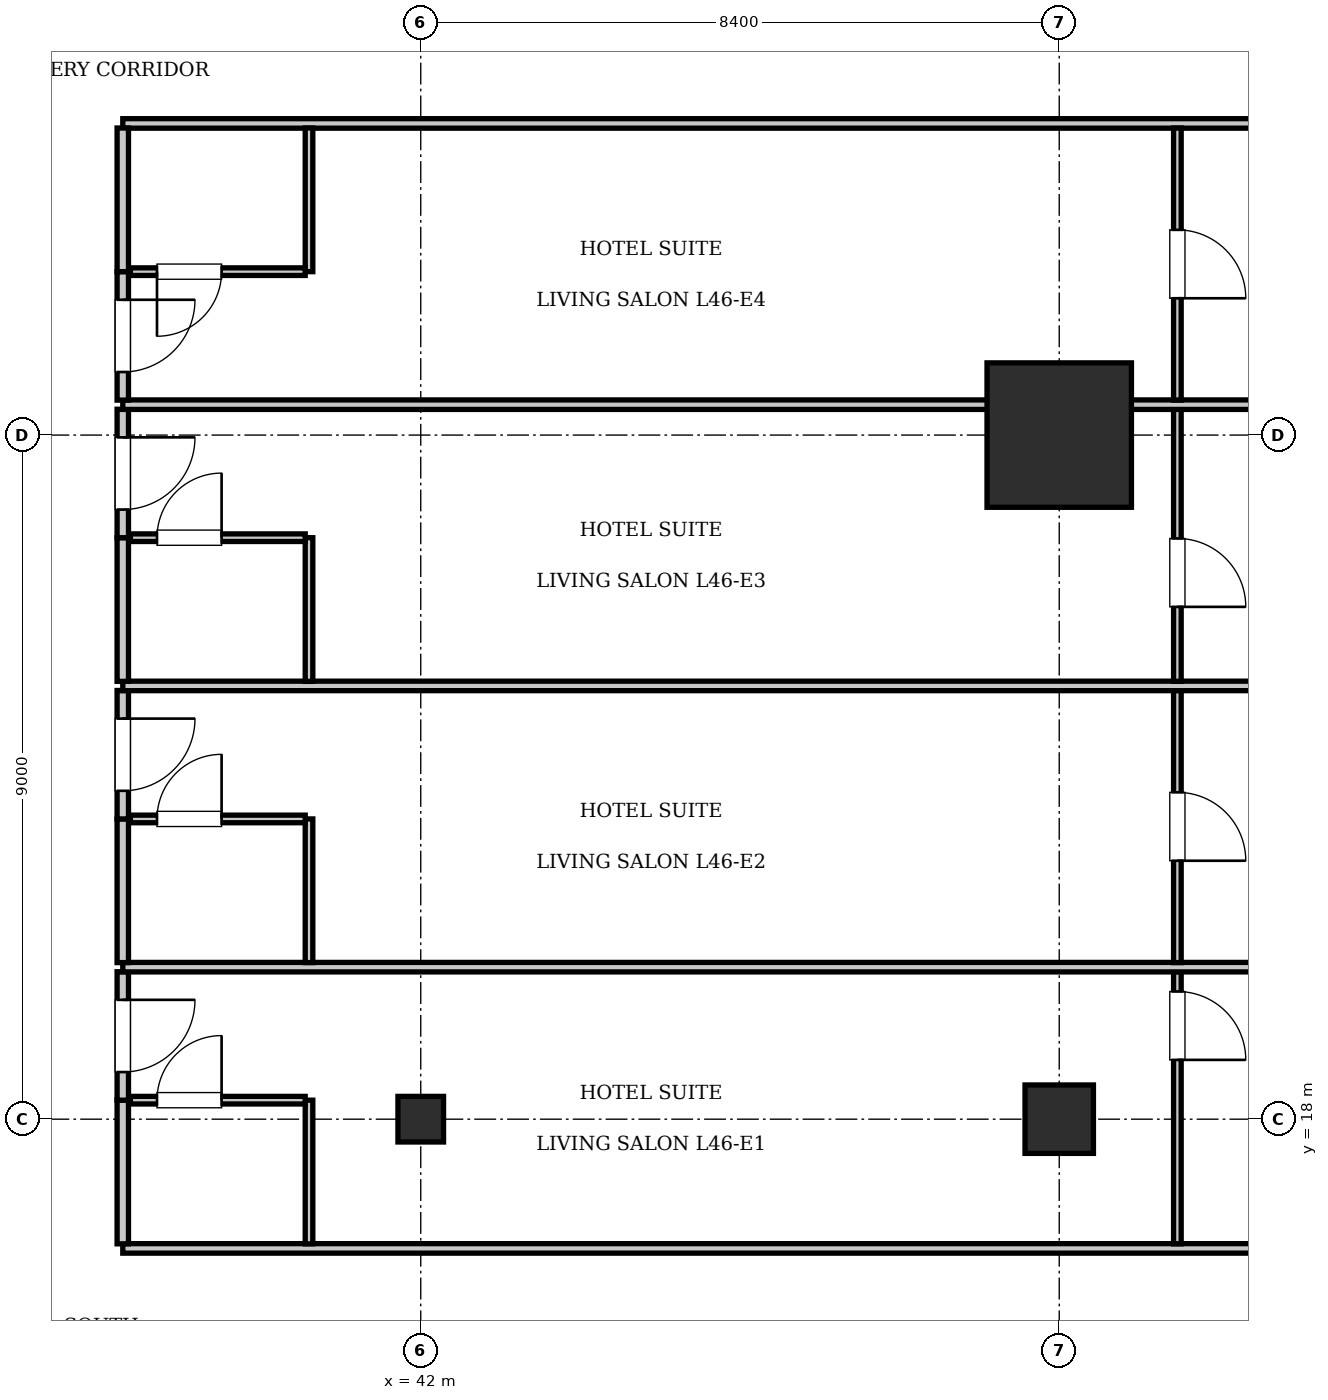
"""IFC4 building model, lengths in metres.
Left out: names, types, materials, properties, quantities, classifications, styles, units other than length and angle.
Written with IfcOpenShell. Run it as: python <this file> out.ifc"""

import sys

from ifc_helpers import new_model, si_unit, direction, frame, frame_2d, origin, origin_2d, place, context, subcontext, project, spatial, rectangle, i_section, extrude, element, fill, save


model = new_model("IFC4")
c1 = context("Model", 3, precision=1e-05, world=origin(), true_north=direction((0.0, 1.0)))
c2 = subcontext(c1, "Body", "Model", "MODEL_VIEW")
j1 = project(units=[si_unit("LENGTHUNIT", "METRE"), si_unit("PLANEANGLEUNIT", "RADIAN")], contexts=[c1])
p1 = place(None, origin())
s1 = spatial("IfcSite", under=j1, at=p1, CompositionType="ELEMENT")
p2 = place(p1, origin())
s2 = spatial("IfcBuilding", under=s1, at=p2, CompositionType="ELEMENT")
p3 = place(p2, frame((0.0, 0.0, 189.0)))
s3 = spatial("IfcBuildingStorey", under=s2, at=p3, CompositionType="ELEMENT", Elevation=189.0)
p4 = place(p3, frame((50.4, 27.0, 0.0), z_axis=(0.0, 0.0, 1.0), x_axis=(1.0, 0.0, 0.0)))
e1 = element("IfcColumn", 1, at=p4, inside=s3, PredefinedType="COLUMN", context=c2, shape_type="SweptSolid", body=[
    extrude(rectangle(XDim=1.9, YDim=1.9, at=origin_2d()), origin(), (0.0, 0.0, 1.0), 3.85),
])
p5 = place(p3, frame((50.4, 18.0, 0.0), z_axis=(0.0, 0.0, 1.0), x_axis=(1.0, 0.0, 0.0)))
e2 = element("IfcColumn", 2, at=p5, inside=s3, PredefinedType="COLUMN", context=c2, shape_type="SweptSolid", body=[
    extrude(rectangle(XDim=0.9, YDim=0.9, at=origin_2d()), origin(), (0.0, 0.0, 1.0), 3.85),
])
p6 = place(p3, frame((42.0, 18.0, 0.0), z_axis=(0.0, 0.0, 1.0), x_axis=(1.0, 0.0, 0.0)))
e3 = element("IfcColumn", 3, at=p6, inside=s3, PredefinedType="COLUMN", context=c2, shape_type="SweptSolid", body=[
    extrude(i_section(OverallWidth=0.6, OverallDepth=0.6, WebThickness=0.025, FlangeThickness=0.038, at=origin_2d()), origin(), (0.0, 0.0, 1.0), 3.85),
])
for number, where, z_axis, x_axis in (
    (4, (38.08, 16.3, 0.0), (0.0, 0.0, 1.0), (1.0, 0.0, 0.0)),
    (5, (38.08, 31.1, 0.0), (0.0, 0.0, 1.0), (1.0, 0.0, 0.0)),
):
    element("IfcWall", number, at=place(p3, frame(where, z_axis=z_axis, x_axis=x_axis)), inside=s3, PredefinedType="PARTITIONING", context=c2, shape_type="SweptSolid", body=[
        extrude(rectangle(XDim=24.32, YDim=0.125, at=frame_2d((12.16, 0.0))), origin(), (0.0, 0.0, 1.0), 3.61),
    ])
p7 = place(p3, frame((38.08, 16.36, 0.0), z_axis=(0.0, 0.0, 1.0), x_axis=(0.0, 1.0, 0.0)))
e6 = element("IfcWall", 6, at=p7, inside=s3, PredefinedType="PARTITIONING", context=c2, shape_type="SweptSolid", body=[
    extrude(rectangle(XDim=1.89, YDim=0.15, at=frame_2d((0.945, 0.0))), origin(), (0.0, 0.0, 1.0), 3.61),
])
p8 = place(p3, frame((38.08, 18.25, 0.0), z_axis=(0.0, 0.0, 1.0), x_axis=(0.0, 1.0, 0.0)))
e7 = element("IfcWall", 7, at=p8, inside=s3, PredefinedType="PARTITIONING", context=c2, shape_type="SweptSolid", body=[
    extrude(rectangle(XDim=1.69, YDim=0.15, at=frame_2d((0.845, 0.0))), origin(), (0.0, 0.0, 1.0), 3.61),
])
p9 = place(p8, frame((0.37, 0.0, 0.0)))
e8 = element("IfcOpeningElement", 8, at=p9, cuts=e7, PredefinedType="OPENING", context=c2, shape_type="SweptSolid", body=[
    extrude(rectangle(XDim=0.95, YDim=2.15, at=frame_2d((0.475, 1.075))), frame((0.0, 0.085, 0.0), z_axis=(0.0, -1.0, 0.0), x_axis=(1.0, 0.0, 0.0)), (0.0, 0.0, 1.0), 0.17),
])
p10 = place(p3, frame((40.53, 16.36, 0.0), z_axis=(0.0, 0.0, 1.0), x_axis=(0.0, 1.0, 0.0)))
e9 = element("IfcWall", 9, at=p10, inside=s3, PredefinedType="PARTITIONING", context=c2, shape_type="SweptSolid", body=[
    extrude(rectangle(XDim=1.89, YDim=0.1, at=frame_2d((0.945, 0.0))), origin(), (0.0, 0.0, 1.0), 3.61),
])
p11 = place(p3, frame((38.18, 18.25, 0.0), z_axis=(0.0, 0.0, 1.0), x_axis=(1.0, 0.0, 0.0)))
e10 = element("IfcWall", 10, at=p11, inside=s3, PredefinedType="PARTITIONING", context=c2, shape_type="SweptSolid", body=[
    extrude(rectangle(XDim=2.3, YDim=0.1, at=frame_2d((1.15, 0.0))), origin(), (0.0, 0.0, 1.0), 3.61),
])
p12 = place(p11, frame((0.35, 0.0, 0.0)))
e11 = element("IfcOpeningElement", 11, at=p12, cuts=e10, PredefinedType="OPENING", context=c2, shape_type="SweptSolid", body=[
    extrude(rectangle(XDim=0.85, YDim=2.1, at=frame_2d((0.425, 1.05))), frame((0.0, 0.06, 0.0), z_axis=(0.0, -1.0, 0.0), x_axis=(1.0, 0.0, 0.0)), (0.0, 0.0, 1.0), 0.12),
])
p13 = place(p3, frame((51.954, 16.36, 0.0), z_axis=(0.0, 0.0, 1.0), x_axis=(0.0, 1.0, 0.0)))
e12 = element("IfcWall", 12, at=p13, inside=s3, PredefinedType="PARTITIONING", context=c2, shape_type="SweptSolid", body=[
    extrude(rectangle(XDim=3.58, YDim=0.1, at=frame_2d((1.79, 0.0))), origin(), (0.0, 0.0, 1.0), 3.61),
])
p14 = place(p13, frame((2.42, 0.0, 0.0)))
e13 = element("IfcOpeningElement", 13, at=p14, cuts=e12, PredefinedType="OPENING", context=c2, shape_type="SweptSolid", body=[
    extrude(rectangle(XDim=0.9, YDim=2.1, at=frame_2d((0.45, 1.05))), frame((0.0, 0.06, 0.0), z_axis=(0.0, -1.0, 0.0), x_axis=(1.0, 0.0, 0.0)), (0.0, 0.0, 1.0), 0.12),
])
p15 = place(p3, frame((38.08, 20.0, 0.0), z_axis=(0.0, 0.0, 1.0), x_axis=(1.0, 0.0, 0.0)))
e14 = element("IfcWall", 14, at=p15, inside=s3, PredefinedType="PARTITIONING", context=c2, shape_type="SweptSolid", body=[
    extrude(rectangle(XDim=24.32, YDim=0.125, at=frame_2d((12.16, 0.0))), origin(), (0.0, 0.0, 1.0), 3.61),
])
p16 = place(p3, frame((38.08, 20.06, 0.0), z_axis=(0.0, 0.0, 1.0), x_axis=(0.0, 1.0, 0.0)))
e15 = element("IfcWall", 15, at=p16, inside=s3, PredefinedType="PARTITIONING", context=c2, shape_type="SweptSolid", body=[
    extrude(rectangle(XDim=1.89, YDim=0.15, at=frame_2d((0.945, 0.0))), origin(), (0.0, 0.0, 1.0), 3.61),
])
p17 = place(p3, frame((38.08, 21.95, 0.0), z_axis=(0.0, 0.0, 1.0), x_axis=(0.0, 1.0, 0.0)))
e16 = element("IfcWall", 16, at=p17, inside=s3, PredefinedType="PARTITIONING", context=c2, shape_type="SweptSolid", body=[
    extrude(rectangle(XDim=1.69, YDim=0.15, at=frame_2d((0.845, 0.0))), origin(), (0.0, 0.0, 1.0), 3.61),
])
p18 = place(p17, frame((0.37, 0.0, 0.0)))
e17 = element("IfcOpeningElement", 17, at=p18, cuts=e16, PredefinedType="OPENING", context=c2, shape_type="SweptSolid", body=[
    extrude(rectangle(XDim=0.95, YDim=2.15, at=frame_2d((0.475, 1.075))), frame((0.0, 0.085, 0.0), z_axis=(0.0, -1.0, 0.0), x_axis=(1.0, 0.0, 0.0)), (0.0, 0.0, 1.0), 0.17),
])
p19 = place(p3, frame((40.53, 20.06, 0.0), z_axis=(0.0, 0.0, 1.0), x_axis=(0.0, 1.0, 0.0)))
e18 = element("IfcWall", 18, at=p19, inside=s3, PredefinedType="PARTITIONING", context=c2, shape_type="SweptSolid", body=[
    extrude(rectangle(XDim=1.89, YDim=0.1, at=frame_2d((0.945, 0.0))), origin(), (0.0, 0.0, 1.0), 3.61),
])
p20 = place(p3, frame((38.18, 21.95, 0.0), z_axis=(0.0, 0.0, 1.0), x_axis=(1.0, 0.0, 0.0)))
e19 = element("IfcWall", 19, at=p20, inside=s3, PredefinedType="PARTITIONING", context=c2, shape_type="SweptSolid", body=[
    extrude(rectangle(XDim=2.3, YDim=0.1, at=frame_2d((1.15, 0.0))), origin(), (0.0, 0.0, 1.0), 3.61),
])
p21 = place(p20, frame((0.35, 0.0, 0.0)))
e20 = element("IfcOpeningElement", 20, at=p21, cuts=e19, PredefinedType="OPENING", context=c2, shape_type="SweptSolid", body=[
    extrude(rectangle(XDim=0.85, YDim=2.1, at=frame_2d((0.425, 1.05))), frame((0.0, 0.06, 0.0), z_axis=(0.0, -1.0, 0.0), x_axis=(1.0, 0.0, 0.0)), (0.0, 0.0, 1.0), 0.12),
])
p22 = place(p3, frame((51.954, 20.06, 0.0), z_axis=(0.0, 0.0, 1.0), x_axis=(0.0, 1.0, 0.0)))
e21 = element("IfcWall", 21, at=p22, inside=s3, PredefinedType="PARTITIONING", context=c2, shape_type="SweptSolid", body=[
    extrude(rectangle(XDim=3.58, YDim=0.1, at=frame_2d((1.79, 0.0))), origin(), (0.0, 0.0, 1.0), 3.61),
])
p23 = place(p22, frame((1.34, 0.0, 0.0)))
e22 = element("IfcOpeningElement", 22, at=p23, cuts=e21, PredefinedType="OPENING", context=c2, shape_type="SweptSolid", body=[
    extrude(rectangle(XDim=0.9, YDim=2.1, at=frame_2d((0.45, 1.05))), frame((0.0, 0.06, 0.0), z_axis=(0.0, -1.0, 0.0), x_axis=(1.0, 0.0, 0.0)), (0.0, 0.0, 1.0), 0.12),
])
p24 = place(p3, frame((38.08, 23.7, 0.0), z_axis=(0.0, 0.0, 1.0), x_axis=(1.0, 0.0, 0.0)))
e23 = element("IfcWall", 23, at=p24, inside=s3, PredefinedType="PARTITIONING", context=c2, shape_type="SweptSolid", body=[
    extrude(rectangle(XDim=24.32, YDim=0.125, at=frame_2d((12.16, 0.0))), origin(), (0.0, 0.0, 1.0), 3.61),
])
p25 = place(p3, frame((38.08, 23.76, 0.0), z_axis=(0.0, 0.0, 1.0), x_axis=(0.0, 1.0, 0.0)))
e24 = element("IfcWall", 24, at=p25, inside=s3, PredefinedType="PARTITIONING", context=c2, shape_type="SweptSolid", body=[
    extrude(rectangle(XDim=1.89, YDim=0.15, at=frame_2d((0.945, 0.0))), origin(), (0.0, 0.0, 1.0), 3.61),
])
p26 = place(p3, frame((38.08, 25.65, 0.0), z_axis=(0.0, 0.0, 1.0), x_axis=(0.0, 1.0, 0.0)))
e25 = element("IfcWall", 25, at=p26, inside=s3, PredefinedType="PARTITIONING", context=c2, shape_type="SweptSolid", body=[
    extrude(rectangle(XDim=1.69, YDim=0.15, at=frame_2d((0.845, 0.0))), origin(), (0.0, 0.0, 1.0), 3.61),
])
p27 = place(p26, frame((0.37, 0.0, 0.0)))
e26 = element("IfcOpeningElement", 26, at=p27, cuts=e25, PredefinedType="OPENING", context=c2, shape_type="SweptSolid", body=[
    extrude(rectangle(XDim=0.95, YDim=2.15, at=frame_2d((0.475, 1.075))), frame((0.0, 0.085, 0.0), z_axis=(0.0, -1.0, 0.0), x_axis=(1.0, 0.0, 0.0)), (0.0, 0.0, 1.0), 0.17),
])
p28 = place(p3, frame((40.53, 23.76, 0.0), z_axis=(0.0, 0.0, 1.0), x_axis=(0.0, 1.0, 0.0)))
e27 = element("IfcWall", 27, at=p28, inside=s3, PredefinedType="PARTITIONING", context=c2, shape_type="SweptSolid", body=[
    extrude(rectangle(XDim=1.89, YDim=0.1, at=frame_2d((0.945, 0.0))), origin(), (0.0, 0.0, 1.0), 3.61),
])
p29 = place(p3, frame((38.18, 25.65, 0.0), z_axis=(0.0, 0.0, 1.0), x_axis=(1.0, 0.0, 0.0)))
e28 = element("IfcWall", 28, at=p29, inside=s3, PredefinedType="PARTITIONING", context=c2, shape_type="SweptSolid", body=[
    extrude(rectangle(XDim=2.3, YDim=0.1, at=frame_2d((1.15, 0.0))), origin(), (0.0, 0.0, 1.0), 3.61),
])
p30 = place(p29, frame((0.35, 0.0, 0.0)))
e29 = element("IfcOpeningElement", 29, at=p30, cuts=e28, PredefinedType="OPENING", context=c2, shape_type="SweptSolid", body=[
    extrude(rectangle(XDim=0.85, YDim=2.1, at=frame_2d((0.425, 1.05))), frame((0.0, 0.06, 0.0), z_axis=(0.0, -1.0, 0.0), x_axis=(1.0, 0.0, 0.0)), (0.0, 0.0, 1.0), 0.12),
])
p31 = place(p3, frame((51.954, 23.76, 0.0), z_axis=(0.0, 0.0, 1.0), x_axis=(0.0, 1.0, 0.0)))
e30 = element("IfcWall", 30, at=p31, inside=s3, PredefinedType="PARTITIONING", context=c2, shape_type="SweptSolid", body=[
    extrude(rectangle(XDim=3.58, YDim=0.1, at=frame_2d((1.79, 0.0))), origin(), (0.0, 0.0, 1.0), 3.61),
])
p32 = place(p31, frame((0.98, 0.0, 0.0)))
e31 = element("IfcOpeningElement", 31, at=p32, cuts=e30, PredefinedType="OPENING", context=c2, shape_type="SweptSolid", body=[
    extrude(rectangle(XDim=0.9, YDim=2.1, at=frame_2d((0.45, 1.05))), frame((0.0, 0.06, 0.0), z_axis=(0.0, -1.0, 0.0), x_axis=(1.0, 0.0, 0.0)), (0.0, 0.0, 1.0), 0.12),
])
p33 = place(p3, frame((38.08, 27.4, 0.0), z_axis=(0.0, 0.0, 1.0), x_axis=(1.0, 0.0, 0.0)))
e32 = element("IfcWall", 32, at=p33, inside=s3, PredefinedType="PARTITIONING", context=c2, shape_type="SweptSolid", body=[
    extrude(rectangle(XDim=24.32, YDim=0.125, at=frame_2d((12.16, 0.0))), origin(), (0.0, 0.0, 1.0), 3.61),
])
p34 = place(p3, frame((38.08, 27.46, 0.0), z_axis=(0.0, 0.0, 1.0), x_axis=(0.0, 1.0, 0.0)))
e33 = element("IfcWall", 33, at=p34, inside=s3, PredefinedType="PARTITIONING", context=c2, shape_type="SweptSolid", body=[
    extrude(rectangle(XDim=1.69, YDim=0.15, at=frame_2d((0.845, 0.0))), origin(), (0.0, 0.0, 1.0), 3.61),
])
p35 = place(p34, frame((0.37, 0.0, 0.0)))
e34 = element("IfcOpeningElement", 34, at=p35, cuts=e33, PredefinedType="OPENING", context=c2, shape_type="SweptSolid", body=[
    extrude(rectangle(XDim=0.95, YDim=2.15, at=frame_2d((0.475, 1.075))), frame((0.0, 0.085, 0.0), z_axis=(0.0, -1.0, 0.0), x_axis=(1.0, 0.0, 0.0)), (0.0, 0.0, 1.0), 0.17),
])
p36 = place(p3, frame((38.08, 29.15, 0.0), z_axis=(0.0, 0.0, 1.0), x_axis=(0.0, 1.0, 0.0)))
e35 = element("IfcWall", 35, at=p36, inside=s3, PredefinedType="PARTITIONING", context=c2, shape_type="SweptSolid", body=[
    extrude(rectangle(XDim=1.89, YDim=0.15, at=frame_2d((0.945, 0.0))), origin(), (0.0, 0.0, 1.0), 3.61),
])
p37 = place(p3, frame((40.53, 29.15, 0.0), z_axis=(0.0, 0.0, 1.0), x_axis=(0.0, 1.0, 0.0)))
e36 = element("IfcWall", 36, at=p37, inside=s3, PredefinedType="PARTITIONING", context=c2, shape_type="SweptSolid", body=[
    extrude(rectangle(XDim=1.89, YDim=0.1, at=frame_2d((0.945, 0.0))), origin(), (0.0, 0.0, 1.0), 3.61),
])
p38 = place(p3, frame((38.18, 29.15, 0.0), z_axis=(0.0, 0.0, 1.0), x_axis=(1.0, 0.0, 0.0)))
e37 = element("IfcWall", 37, at=p38, inside=s3, PredefinedType="PARTITIONING", context=c2, shape_type="SweptSolid", body=[
    extrude(rectangle(XDim=2.3, YDim=0.1, at=frame_2d((1.15, 0.0))), origin(), (0.0, 0.0, 1.0), 3.61),
])
p39 = place(p38, frame((0.35, 0.0, 0.0)))
e38 = element("IfcOpeningElement", 38, at=p39, cuts=e37, PredefinedType="OPENING", context=c2, shape_type="SweptSolid", body=[
    extrude(rectangle(XDim=0.85, YDim=2.1, at=frame_2d((0.425, 1.05))), frame((0.0, 0.06, 0.0), z_axis=(0.0, -1.0, 0.0), x_axis=(1.0, 0.0, 0.0)), (0.0, 0.0, 1.0), 0.12),
])
p40 = place(p3, frame((51.954, 27.46, 0.0), z_axis=(0.0, 0.0, 1.0), x_axis=(0.0, 1.0, 0.0)))
e39 = element("IfcWall", 39, at=p40, inside=s3, PredefinedType="PARTITIONING", context=c2, shape_type="SweptSolid", body=[
    extrude(rectangle(XDim=3.58, YDim=0.1, at=frame_2d((1.79, 0.0))), origin(), (0.0, 0.0, 1.0), 3.61),
])
p41 = place(p40, frame((1.34, 0.0, 0.0)))
e40 = element("IfcOpeningElement", 40, at=p41, cuts=e39, PredefinedType="OPENING", context=c2, shape_type="SweptSolid", body=[
    extrude(rectangle(XDim=0.9, YDim=2.1, at=frame_2d((0.45, 1.05))), frame((0.0, 0.06, 0.0), z_axis=(0.0, -1.0, 0.0), x_axis=(1.0, 0.0, 0.0)), (0.0, 0.0, 1.0), 0.12),
])
p42 = place(p12, origin())
e41 = element("IfcDoor", 41, at=p42, inside=s3, OperationType="SINGLE_SWING_RIGHT", PredefinedType="DOOR", context=c2, shape_type="SweptSolid", body=[
    extrude(rectangle(XDim=0.85, YDim=2.1, at=frame_2d((0.425, 1.05))), frame((0.0, 0.025, 0.0), z_axis=(0.0, -1.0, 0.0), x_axis=(1.0, 0.0, 0.0)), (0.0, 0.0, 1.0), 0.05),
])
fill(e11, e41)
p43 = place(p9, frame((0.95, 0.0, 0.0), z_axis=(0.0, 0.0, 1.0), x_axis=(-1.0, 0.0, 0.0)))
e42 = element("IfcDoor", 42, at=p43, inside=s3, OperationType="SINGLE_SWING_LEFT", PredefinedType="DOOR", context=c2, shape_type="SweptSolid", body=[
    extrude(rectangle(XDim=0.95, YDim=2.15, at=frame_2d((0.475, 1.075))), frame((0.0, 0.025, 0.0), z_axis=(0.0, -1.0, 0.0), x_axis=(1.0, 0.0, 0.0)), (0.0, 0.0, 1.0), 0.05),
])
fill(e8, e42)
p44 = place(p14, frame((0.9, 0.0, 0.0), z_axis=(0.0, 0.0, 1.0), x_axis=(-1.0, 0.0, 0.0)))
e43 = element("IfcDoor", 43, at=p44, inside=s3, OperationType="SINGLE_SWING_RIGHT", PredefinedType="DOOR", context=c2, shape_type="SweptSolid", body=[
    extrude(rectangle(XDim=0.9, YDim=2.1, at=frame_2d((0.45, 1.05))), frame((0.0, 0.025, 0.0), z_axis=(0.0, -1.0, 0.0), x_axis=(1.0, 0.0, 0.0)), (0.0, 0.0, 1.0), 0.05),
])
fill(e13, e43)
p45 = place(p21, origin())
e44 = element("IfcDoor", 44, at=p45, inside=s3, OperationType="SINGLE_SWING_RIGHT", PredefinedType="DOOR", context=c2, shape_type="SweptSolid", body=[
    extrude(rectangle(XDim=0.85, YDim=2.1, at=frame_2d((0.425, 1.05))), frame((0.0, 0.025, 0.0), z_axis=(0.0, -1.0, 0.0), x_axis=(1.0, 0.0, 0.0)), (0.0, 0.0, 1.0), 0.05),
])
fill(e20, e44)
p46 = place(p18, frame((0.95, 0.0, 0.0), z_axis=(0.0, 0.0, 1.0), x_axis=(-1.0, 0.0, 0.0)))
e45 = element("IfcDoor", 45, at=p46, inside=s3, OperationType="SINGLE_SWING_LEFT", PredefinedType="DOOR", context=c2, shape_type="SweptSolid", body=[
    extrude(rectangle(XDim=0.95, YDim=2.15, at=frame_2d((0.475, 1.075))), frame((0.0, 0.025, 0.0), z_axis=(0.0, -1.0, 0.0), x_axis=(1.0, 0.0, 0.0)), (0.0, 0.0, 1.0), 0.05),
])
fill(e17, e45)
p47 = place(p23, frame((0.9, 0.0, 0.0), z_axis=(0.0, 0.0, 1.0), x_axis=(-1.0, 0.0, 0.0)))
e46 = element("IfcDoor", 46, at=p47, inside=s3, OperationType="SINGLE_SWING_RIGHT", PredefinedType="DOOR", context=c2, shape_type="SweptSolid", body=[
    extrude(rectangle(XDim=0.9, YDim=2.1, at=frame_2d((0.45, 1.05))), frame((0.0, 0.025, 0.0), z_axis=(0.0, -1.0, 0.0), x_axis=(1.0, 0.0, 0.0)), (0.0, 0.0, 1.0), 0.05),
])
fill(e22, e46)
p48 = place(p30, origin())
e47 = element("IfcDoor", 47, at=p48, inside=s3, OperationType="SINGLE_SWING_RIGHT", PredefinedType="DOOR", context=c2, shape_type="SweptSolid", body=[
    extrude(rectangle(XDim=0.85, YDim=2.1, at=frame_2d((0.425, 1.05))), frame((0.0, 0.025, 0.0), z_axis=(0.0, -1.0, 0.0), x_axis=(1.0, 0.0, 0.0)), (0.0, 0.0, 1.0), 0.05),
])
fill(e29, e47)
p49 = place(p27, frame((0.95, 0.0, 0.0), z_axis=(0.0, 0.0, 1.0), x_axis=(-1.0, 0.0, 0.0)))
e48 = element("IfcDoor", 48, at=p49, inside=s3, OperationType="SINGLE_SWING_LEFT", PredefinedType="DOOR", context=c2, shape_type="SweptSolid", body=[
    extrude(rectangle(XDim=0.95, YDim=2.15, at=frame_2d((0.475, 1.075))), frame((0.0, 0.025, 0.0), z_axis=(0.0, -1.0, 0.0), x_axis=(1.0, 0.0, 0.0)), (0.0, 0.0, 1.0), 0.05),
])
fill(e26, e48)
p50 = place(p32, frame((0.9, 0.0, 0.0), z_axis=(0.0, 0.0, 1.0), x_axis=(-1.0, 0.0, 0.0)))
e49 = element("IfcDoor", 49, at=p50, inside=s3, OperationType="SINGLE_SWING_RIGHT", PredefinedType="DOOR", context=c2, shape_type="SweptSolid", body=[
    extrude(rectangle(XDim=0.9, YDim=2.1, at=frame_2d((0.45, 1.05))), frame((0.0, 0.025, 0.0), z_axis=(0.0, -1.0, 0.0), x_axis=(1.0, 0.0, 0.0)), (0.0, 0.0, 1.0), 0.05),
])
fill(e31, e49)
p51 = place(p39, frame((0.85, 0.0, 0.0), z_axis=(0.0, 0.0, 1.0), x_axis=(-1.0, 0.0, 0.0)))
e50 = element("IfcDoor", 50, at=p51, inside=s3, OperationType="SINGLE_SWING_RIGHT", PredefinedType="DOOR", context=c2, shape_type="SweptSolid", body=[
    extrude(rectangle(XDim=0.85, YDim=2.1, at=frame_2d((0.425, 1.05))), frame((0.0, 0.025, 0.0), z_axis=(0.0, -1.0, 0.0), x_axis=(1.0, 0.0, 0.0)), (0.0, 0.0, 1.0), 0.05),
])
fill(e38, e50)
p52 = place(p35, frame((0.95, 0.0, 0.0), z_axis=(0.0, 0.0, 1.0), x_axis=(-1.0, 0.0, 0.0)))
e51 = element("IfcDoor", 51, at=p52, inside=s3, OperationType="SINGLE_SWING_LEFT", PredefinedType="DOOR", context=c2, shape_type="SweptSolid", body=[
    extrude(rectangle(XDim=0.95, YDim=2.15, at=frame_2d((0.475, 1.075))), frame((0.0, 0.025, 0.0), z_axis=(0.0, -1.0, 0.0), x_axis=(1.0, 0.0, 0.0)), (0.0, 0.0, 1.0), 0.05),
])
fill(e34, e51)
p53 = place(p41, frame((0.9, 0.0, 0.0), z_axis=(0.0, 0.0, 1.0), x_axis=(-1.0, 0.0, 0.0)))
e52 = element("IfcDoor", 52, at=p53, inside=s3, OperationType="SINGLE_SWING_RIGHT", PredefinedType="DOOR", context=c2, shape_type="SweptSolid", body=[
    extrude(rectangle(XDim=0.9, YDim=2.1, at=frame_2d((0.45, 1.05))), frame((0.0, 0.025, 0.0), z_axis=(0.0, -1.0, 0.0), x_axis=(1.0, 0.0, 0.0)), (0.0, 0.0, 1.0), 0.05),
])
fill(e40, e52)
save(model, sys.argv[1])
